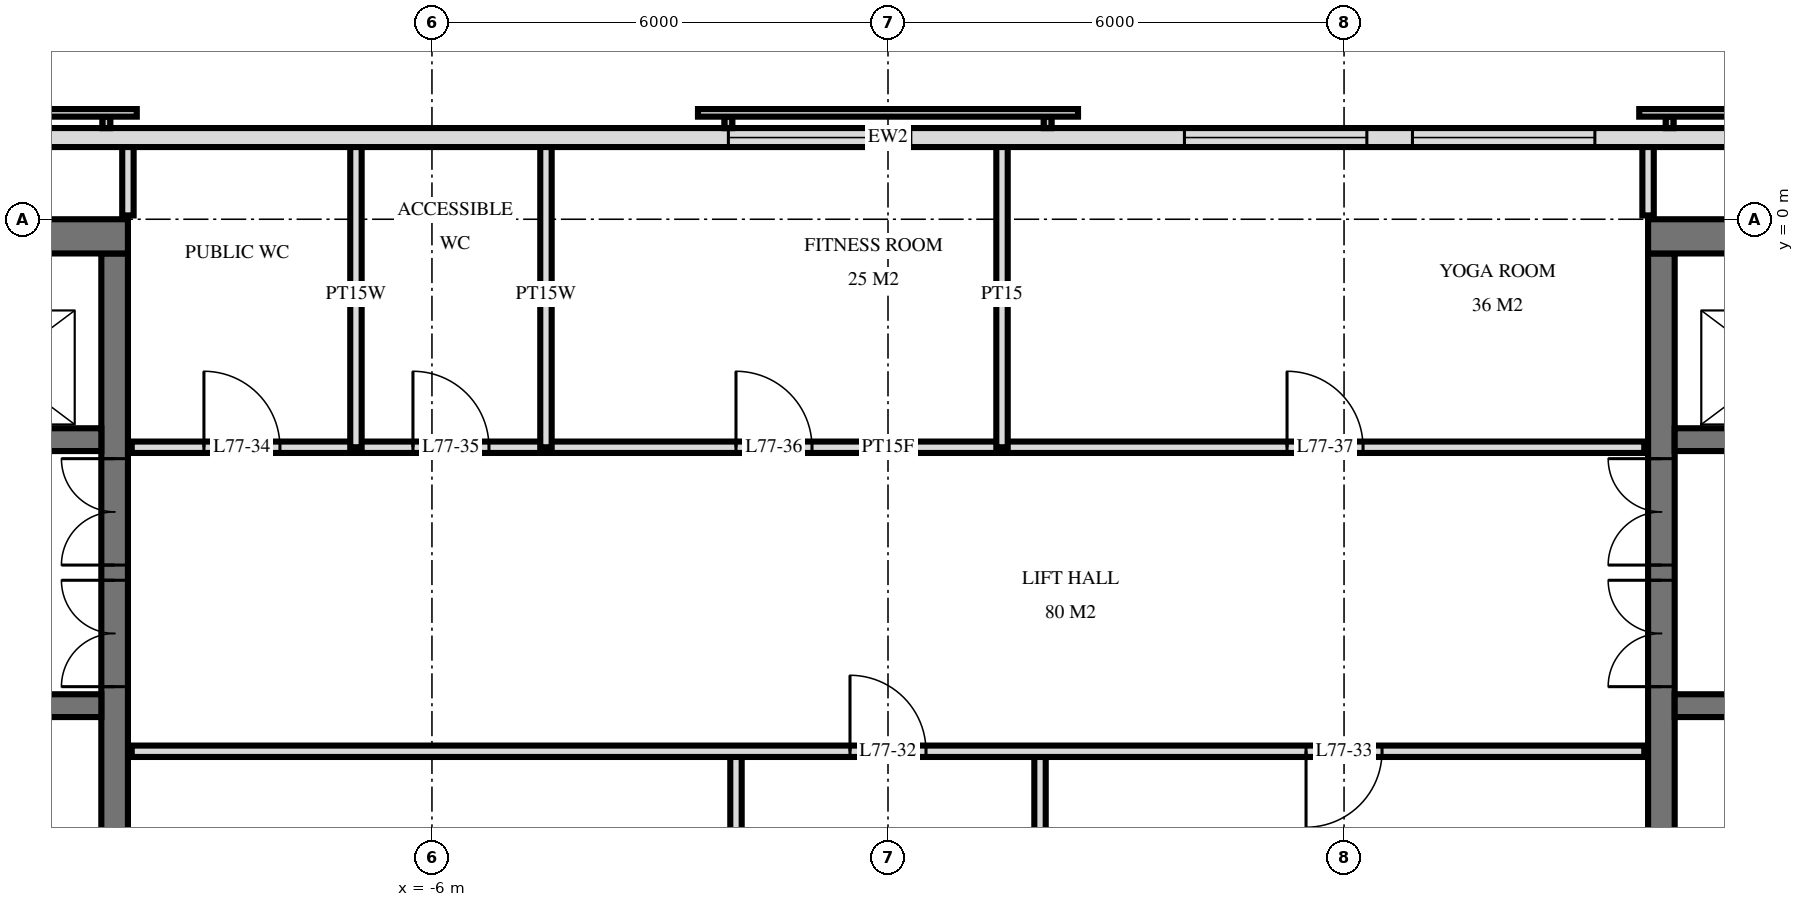
"""IFC4 building model, lengths in metres.
Left out: names, types, materials, properties, quantities, classifications, styles, units other than length and angle.
Written with IfcOpenShell. Run it as: python <this file> out.ifc"""

import sys

from ifc_helpers import new_model, si_unit, direction, frame, frame_2d, origin, place, context, subcontext, project, spatial, rectangle, extrude, element, fill, save


model = new_model("IFC4")
c1 = context("Model", 3, precision=1e-05, world=origin(), true_north=direction((0.0, 1.0)))
c2 = subcontext(c1, "Body", "Model", "MODEL_VIEW")
j1 = project(units=[si_unit("LENGTHUNIT", "METRE"), si_unit("PLANEANGLEUNIT", "RADIAN")], contexts=[c1])
p1 = place(None, origin())
s1 = spatial("IfcSite", under=j1, at=p1, CompositionType="ELEMENT")
p2 = place(p1, origin())
s2 = spatial("IfcBuilding", under=s1, at=p2, CompositionType="ELEMENT")
p3 = place(p2, frame((0.0, 0.0, 291.1)))
s3 = spatial("IfcBuildingStorey", under=s2, at=p3, CompositionType="ELEMENT", Elevation=291.1)
p4 = place(p3, frame((-19.5, -0.225, 0.0), z_axis=(0.0, 0.0, 1.0), x_axis=(1.0, 0.0, 0.0)))
e1 = element("IfcWall", 1, at=p4, inside=s3, PredefinedType="SHEAR", context=c2, shape_type="SweptSolid", body=[
    extrude(rectangle(XDim=9.5, YDim=0.45, at=frame_2d((4.75, 0.0))), origin(), (0.0, 0.0, 1.0), 3.5),
])
p5 = place(p3, frame((-10.175, -14.55, 0.0), z_axis=(0.0, 0.0, 1.0), x_axis=(0.0, 1.0, 0.0)))
e2 = element("IfcWall", 2, at=p5, inside=s3, PredefinedType="SHEAR", context=c2, shape_type="SweptSolid", body=[
    extrude(rectangle(XDim=14.1, YDim=0.35, at=frame_2d((7.05, 0.0))), origin(), (0.0, 0.0, 1.0), 3.5),
])
p6 = place(p5, frame((8.4, 0.0, 0.0)))
e3 = element("IfcOpeningElement", 3, at=p6, cuts=e2, PredefinedType="OPENING", context=c2, shape_type="SweptSolid", body=[
    extrude(rectangle(XDim=1.4, YDim=2.4, at=frame_2d((0.7, 1.2))), frame((0.0, 0.185, 0.0), z_axis=(0.0, -1.0, 0.0), x_axis=(1.0, 0.0, 0.0)), (0.0, 0.0, 1.0), 0.37),
])
p7 = place(p5, frame((10.0, 0.0, 0.0)))
e4 = element("IfcOpeningElement", 4, at=p7, cuts=e2, PredefinedType="OPENING", context=c2, shape_type="SweptSolid", body=[
    extrude(rectangle(XDim=1.4, YDim=2.4, at=frame_2d((0.7, 1.2))), frame((0.0, 0.185, 0.0), z_axis=(0.0, -1.0, 0.0), x_axis=(1.0, 0.0, 0.0)), (0.0, 0.0, 1.0), 0.37),
])
p8 = place(p5, frame((4.0, 0.0, 0.0)))
e5 = element("IfcOpeningElement", 5, at=p8, cuts=e2, PredefinedType="OPENING", context=c2, shape_type="SweptSolid", body=[
    extrude(rectangle(XDim=1.2, YDim=2.1, at=frame_2d((0.6, 1.05))), frame((0.0, 0.185, 0.0), z_axis=(0.0, -1.0, 0.0), x_axis=(1.0, 0.0, 0.0)), (0.0, 0.0, 1.0), 0.37),
])
p9 = place(p3, frame((-19.05, -2.9, 0.0), z_axis=(0.0, 0.0, 1.0), x_axis=(1.0, 0.0, 0.0)))
e6 = element("IfcWall", 6, at=p9, inside=s3, PredefinedType="SHEAR", context=c2, shape_type="SweptSolid", body=[
    extrude(rectangle(XDim=8.7, YDim=0.3, at=frame_2d((4.35, 0.0))), origin(), (0.0, 0.0, 1.0), 3.5),
])
p10 = place(p9, frame((6.8, 0.0, 0.0)))
e7 = element("IfcOpeningElement", 7, at=p10, cuts=e6, PredefinedType="OPENING", context=c2, shape_type="SweptSolid", body=[
    extrude(rectangle(XDim=1.1, YDim=2.1, at=frame_2d((0.55, 1.05))), frame((0.0, 0.16, 0.0), z_axis=(0.0, -1.0, 0.0), x_axis=(1.0, 0.0, 0.0)), (0.0, 0.0, 1.0), 0.32),
])
p11 = place(p9, frame((3.8, 0.0, 0.0)))
e8 = element("IfcOpeningElement", 8, at=p11, cuts=e6, PredefinedType="OPENING", context=c2, shape_type="SweptSolid", body=[
    extrude(rectangle(XDim=1.1, YDim=2.1, at=frame_2d((0.55, 1.05))), frame((0.0, 0.16, 0.0), z_axis=(0.0, -1.0, 0.0), x_axis=(1.0, 0.0, 0.0)), (0.0, 0.0, 1.0), 0.32),
])
p12 = place(p9, frame((1.613, 0.0, 0.0)))
e9 = element("IfcOpeningElement", 9, at=p12, cuts=e6, PredefinedType="OPENING", context=c2, shape_type="SweptSolid", body=[
    extrude(rectangle(XDim=0.9, YDim=2.1, at=frame_2d((0.45, 1.05))), frame((0.0, 0.16, 0.0), z_axis=(0.0, -1.0, 0.0), x_axis=(1.0, 0.0, 0.0)), (0.0, 0.0, 1.0), 0.32),
])
p13 = place(p9, frame((0.188, 0.0, 0.0)))
e10 = element("IfcOpeningElement", 10, at=p13, cuts=e6, PredefinedType="OPENING", context=c2, shape_type="SweptSolid", body=[
    extrude(rectangle(XDim=0.9, YDim=2.1, at=frame_2d((0.45, 1.05))), frame((0.0, 0.16, 0.0), z_axis=(0.0, -1.0, 0.0), x_axis=(1.0, 0.0, 0.0)), (0.0, 0.0, 1.0), 0.32),
])
p14 = place(p3, frame((-19.05, -6.4, 0.0), z_axis=(0.0, 0.0, 1.0), x_axis=(1.0, 0.0, 0.0)))
e11 = element("IfcWall", 11, at=p14, inside=s3, PredefinedType="SHEAR", context=c2, shape_type="SweptSolid", body=[
    extrude(rectangle(XDim=8.7, YDim=0.3, at=frame_2d((4.35, 0.0))), origin(), (0.0, 0.0, 1.0), 3.5),
])
p15 = place(p14, frame((0.8, 0.0, 0.0)))
e12 = element("IfcOpeningElement", 12, at=p15, cuts=e11, PredefinedType="OPENING", context=c2, shape_type="SweptSolid", body=[
    extrude(rectangle(XDim=1.1, YDim=2.1, at=frame_2d((0.55, 1.05))), frame((0.0, 0.16, 0.0), z_axis=(0.0, -1.0, 0.0), x_axis=(1.0, 0.0, 0.0)), (0.0, 0.0, 1.0), 0.32),
])
p16 = place(p3, frame((10.0, -0.225, 0.0), z_axis=(0.0, 0.0, 1.0), x_axis=(1.0, 0.0, 0.0)))
e13 = element("IfcWall", 13, at=p16, inside=s3, PredefinedType="SHEAR", context=c2, shape_type="SweptSolid", body=[
    extrude(rectangle(XDim=9.5, YDim=0.45, at=frame_2d((4.75, 0.0))), origin(), (0.0, 0.0, 1.0), 3.5),
])
p17 = place(p3, frame((10.175, -14.55, 0.0), z_axis=(0.0, 0.0, 1.0), x_axis=(0.0, 1.0, 0.0)))
e14 = element("IfcWall", 14, at=p17, inside=s3, PredefinedType="SHEAR", context=c2, shape_type="SweptSolid", body=[
    extrude(rectangle(XDim=14.1, YDim=0.35, at=frame_2d((7.05, 0.0))), origin(), (0.0, 0.0, 1.0), 3.5),
])
p18 = place(p17, frame((8.4, 0.0, 0.0)))
e15 = element("IfcOpeningElement", 15, at=p18, cuts=e14, PredefinedType="OPENING", context=c2, shape_type="SweptSolid", body=[
    extrude(rectangle(XDim=1.4, YDim=2.4, at=frame_2d((0.7, 1.2))), frame((0.0, 0.185, 0.0), z_axis=(0.0, -1.0, 0.0), x_axis=(1.0, 0.0, 0.0)), (0.0, 0.0, 1.0), 0.37),
])
p19 = place(p17, frame((10.0, 0.0, 0.0)))
e16 = element("IfcOpeningElement", 16, at=p19, cuts=e14, PredefinedType="OPENING", context=c2, shape_type="SweptSolid", body=[
    extrude(rectangle(XDim=1.4, YDim=2.4, at=frame_2d((0.7, 1.2))), frame((0.0, 0.185, 0.0), z_axis=(0.0, -1.0, 0.0), x_axis=(1.0, 0.0, 0.0)), (0.0, 0.0, 1.0), 0.37),
])
p20 = place(p17, frame((4.0, 0.0, 0.0)))
e17 = element("IfcOpeningElement", 17, at=p20, cuts=e14, PredefinedType="OPENING", context=c2, shape_type="SweptSolid", body=[
    extrude(rectangle(XDim=1.2, YDim=2.1, at=frame_2d((0.6, 1.05))), frame((0.0, 0.185, 0.0), z_axis=(0.0, -1.0, 0.0), x_axis=(1.0, 0.0, 0.0)), (0.0, 0.0, 1.0), 0.37),
])
p21 = place(p3, frame((10.35, -2.9, 0.0), z_axis=(0.0, 0.0, 1.0), x_axis=(1.0, 0.0, 0.0)))
e18 = element("IfcWall", 18, at=p21, inside=s3, PredefinedType="SHEAR", context=c2, shape_type="SweptSolid", body=[
    extrude(rectangle(XDim=8.7, YDim=0.3, at=frame_2d((4.35, 0.0))), origin(), (0.0, 0.0, 1.0), 3.5),
])
p22 = place(p21, frame((0.8, 0.0, 0.0)))
e19 = element("IfcOpeningElement", 19, at=p22, cuts=e18, PredefinedType="OPENING", context=c2, shape_type="SweptSolid", body=[
    extrude(rectangle(XDim=1.1, YDim=2.1, at=frame_2d((0.55, 1.05))), frame((0.0, 0.16, 0.0), z_axis=(0.0, -1.0, 0.0), x_axis=(1.0, 0.0, 0.0)), (0.0, 0.0, 1.0), 0.32),
])
p23 = place(p21, frame((3.8, 0.0, 0.0)))
e20 = element("IfcOpeningElement", 20, at=p23, cuts=e18, PredefinedType="OPENING", context=c2, shape_type="SweptSolid", body=[
    extrude(rectangle(XDim=1.1, YDim=2.1, at=frame_2d((0.55, 1.05))), frame((0.0, 0.16, 0.0), z_axis=(0.0, -1.0, 0.0), x_axis=(1.0, 0.0, 0.0)), (0.0, 0.0, 1.0), 0.32),
])
p24 = place(p21, frame((6.188, 0.0, 0.0)))
e21 = element("IfcOpeningElement", 21, at=p24, cuts=e18, PredefinedType="OPENING", context=c2, shape_type="SweptSolid", body=[
    extrude(rectangle(XDim=0.9, YDim=2.1, at=frame_2d((0.45, 1.05))), frame((0.0, 0.16, 0.0), z_axis=(0.0, -1.0, 0.0), x_axis=(1.0, 0.0, 0.0)), (0.0, 0.0, 1.0), 0.32),
])
p25 = place(p21, frame((7.613, 0.0, 0.0)))
e22 = element("IfcOpeningElement", 22, at=p25, cuts=e18, PredefinedType="OPENING", context=c2, shape_type="SweptSolid", body=[
    extrude(rectangle(XDim=0.9, YDim=2.1, at=frame_2d((0.45, 1.05))), frame((0.0, 0.16, 0.0), z_axis=(0.0, -1.0, 0.0), x_axis=(1.0, 0.0, 0.0)), (0.0, 0.0, 1.0), 0.32),
])
p26 = place(p3, frame((10.35, -6.4, 0.0), z_axis=(0.0, 0.0, 1.0), x_axis=(1.0, 0.0, 0.0)))
e23 = element("IfcWall", 23, at=p26, inside=s3, PredefinedType="SHEAR", context=c2, shape_type="SweptSolid", body=[
    extrude(rectangle(XDim=8.7, YDim=0.3, at=frame_2d((4.35, 0.0))), origin(), (0.0, 0.0, 1.0), 3.5),
])
p27 = place(p26, frame((6.8, 0.0, 0.0)))
e24 = element("IfcOpeningElement", 24, at=p27, cuts=e23, PredefinedType="OPENING", context=c2, shape_type="SweptSolid", body=[
    extrude(rectangle(XDim=1.1, YDim=2.1, at=frame_2d((0.55, 1.05))), frame((0.0, 0.16, 0.0), z_axis=(0.0, -1.0, 0.0), x_axis=(1.0, 0.0, 0.0)), (0.0, 0.0, 1.0), 0.32),
])
p28 = place(p3, frame((18.575, 1.075, 0.0), z_axis=(0.0, 0.0, 1.0), x_axis=(-1.0, 0.0, 0.0)))
e25 = element("IfcWall", 25, at=p28, inside=s3, PredefinedType="SOLIDWALL", context=c2, shape_type="SweptSolid", body=[
    extrude(rectangle(XDim=37.151, YDim=0.25, at=frame_2d((18.575, 0.0))), origin(), (0.0, 0.0, 1.0), 3.22),
])
p29 = place(p28, frame((9.275, 0.0, 0.9)))
e26 = element("IfcOpeningElement", 26, at=p29, cuts=e25, PredefinedType="OPENING", context=c2, shape_type="SweptSolid", body=[
    extrude(rectangle(XDim=2.4, YDim=1.5, at=frame_2d((1.2, 0.75))), frame((0.0, 0.135, 0.0), z_axis=(0.0, -1.0, 0.0), x_axis=(1.0, 0.0, 0.0)), (0.0, 0.0, 1.0), 0.27),
])
p30 = place(p28, frame((12.275, 0.0, 0.9)))
e27 = element("IfcOpeningElement", 27, at=p30, cuts=e25, PredefinedType="OPENING", context=c2, shape_type="SweptSolid", body=[
    extrude(rectangle(XDim=2.4, YDim=1.5, at=frame_2d((1.2, 0.75))), frame((0.0, 0.135, 0.0), z_axis=(0.0, -1.0, 0.0), x_axis=(1.0, 0.0, 0.0)), (0.0, 0.0, 1.0), 0.27),
])
p31 = place(p28, frame((18.275, 0.0, 0.9)))
e28 = element("IfcOpeningElement", 28, at=p31, cuts=e25, PredefinedType="OPENING", context=c2, shape_type="SweptSolid", body=[
    extrude(rectangle(XDim=2.4, YDim=1.5, at=frame_2d((1.2, 0.75))), frame((0.0, 0.135, 0.0), z_axis=(0.0, -1.0, 0.0), x_axis=(1.0, 0.0, 0.0)), (0.0, 0.0, 1.0), 0.27),
])
p32 = place(p3, frame((10.0, 0.05, 0.0), z_axis=(0.0, 0.0, 1.0), x_axis=(0.0, 1.0, 0.0)))
e29 = element("IfcWall", 29, at=p32, inside=s3, PredefinedType="PARTITIONING", context=c2, shape_type="SweptSolid", body=[
    extrude(rectangle(XDim=0.97, YDim=0.15, at=frame_2d((0.485, 0.0))), origin(), (0.0, 0.0, 1.0), 3.22),
])
p33 = place(p3, frame((2.0, -11.0, 0.0), z_axis=(0.0, 0.0, 1.0), x_axis=(0.0, 1.0, 0.0)))
e30 = element("IfcWall", 30, at=p33, inside=s3, PredefinedType="PARTITIONING", context=c2, shape_type="SweptSolid", body=[
    extrude(rectangle(XDim=4.0, YDim=0.15, at=frame_2d((2.0, 0.0))), origin(), (0.0, 0.0, 1.0), 3.22),
])
p34 = place(p3, frame((1.5, -3.0, 0.0), z_axis=(0.0, 0.0, 1.0), x_axis=(0.0, 1.0, 0.0)))
e31 = element("IfcWall", 31, at=p34, inside=s3, PredefinedType="PARTITIONING", context=c2, shape_type="SweptSolid", body=[
    extrude(rectangle(XDim=4.02, YDim=0.15, at=frame_2d((2.01, 0.0))), origin(), (0.0, 0.0, 1.0), 3.22),
])
p35 = place(p3, frame((-2.0, -11.0, 0.0), z_axis=(0.0, 0.0, 1.0), x_axis=(0.0, 1.0, 0.0)))
e32 = element("IfcWall", 32, at=p35, inside=s3, PredefinedType="PARTITIONING", context=c2, shape_type="SweptSolid", body=[
    extrude(rectangle(XDim=4.0, YDim=0.15, at=frame_2d((2.0, 0.0))), origin(), (0.0, 0.0, 1.0), 3.22),
])
for number, where, z_axis, x_axis in (
    (33, (-4.5, -3.0, 0.0), (0.0, 0.0, 1.0), (0.0, 1.0, 0.0)),
    (34, (-7.0, -3.0, 0.0), (0.0, 0.0, 1.0), (0.0, 1.0, 0.0)),
):
    element("IfcWall", number, at=place(p3, frame(where, z_axis=z_axis, x_axis=x_axis)), inside=s3, PredefinedType="PLUMBINGWALL", context=c2, shape_type="SweptSolid", body=[
        extrude(rectangle(XDim=4.02, YDim=0.15, at=frame_2d((2.01, 0.0))), origin(), (0.0, 0.0, 1.0), 3.22),
    ])
p36 = place(p3, frame((-10.0, 0.05, 0.0), z_axis=(0.0, 0.0, 1.0), x_axis=(0.0, 1.0, 0.0)))
e35 = element("IfcWall", 35, at=p36, inside=s3, PredefinedType="PLUMBINGWALL", context=c2, shape_type="SweptSolid", body=[
    extrude(rectangle(XDim=0.97, YDim=0.15, at=frame_2d((0.485, 0.0))), origin(), (0.0, 0.0, 1.0), 3.22),
])
p37 = place(p3, frame((-9.95, -7.0, 0.0), z_axis=(0.0, 0.0, 1.0), x_axis=(1.0, 0.0, 0.0)))
e36 = element("IfcWall", 36, at=p37, inside=s3, PredefinedType="PARTITIONING", context=c2, shape_type="SweptSolid", body=[
    extrude(rectangle(XDim=19.9, YDim=0.15, at=frame_2d((9.95, 0.0))), origin(), (0.0, 0.0, 1.0), 3.22),
])
p38 = place(p37, frame((9.45, 0.0, 0.0)))
e37 = element("IfcOpeningElement", 37, at=p38, cuts=e36, PredefinedType="OPENING", context=c2, shape_type="SweptSolid", body=[
    extrude(rectangle(XDim=1.0, YDim=2.1, at=frame_2d((0.5, 1.05))), frame((0.0, 0.085, 0.0), z_axis=(0.0, -1.0, 0.0), x_axis=(1.0, 0.0, 0.0)), (0.0, 0.0, 1.0), 0.17),
])
p39 = place(p37, frame((15.45, 0.0, 0.0)))
e38 = element("IfcOpeningElement", 38, at=p39, cuts=e36, PredefinedType="OPENING", context=c2, shape_type="SweptSolid", body=[
    extrude(rectangle(XDim=1.0, YDim=2.1, at=frame_2d((0.5, 1.05))), frame((0.0, 0.085, 0.0), z_axis=(0.0, -1.0, 0.0), x_axis=(1.0, 0.0, 0.0)), (0.0, 0.0, 1.0), 0.17),
])
p40 = place(p3, frame((-9.95, -3.0, 0.0), z_axis=(0.0, 0.0, 1.0), x_axis=(1.0, 0.0, 0.0)))
e39 = element("IfcWall", 39, at=p40, inside=s3, PredefinedType="PARTITIONING", context=c2, shape_type="SweptSolid", body=[
    extrude(rectangle(XDim=19.9, YDim=0.15, at=frame_2d((9.95, 0.0))), origin(), (0.0, 0.0, 1.0), 3.22),
])
p41 = place(p40, frame((0.95, 0.0, 0.0)))
e40 = element("IfcOpeningElement", 40, at=p41, cuts=e39, PredefinedType="OPENING", context=c2, shape_type="SweptSolid", body=[
    extrude(rectangle(XDim=1.0, YDim=2.1, at=frame_2d((0.5, 1.05))), frame((0.0, 0.085, 0.0), z_axis=(0.0, -1.0, 0.0), x_axis=(1.0, 0.0, 0.0)), (0.0, 0.0, 1.0), 0.17),
])
p42 = place(p40, frame((3.7, 0.0, 0.0)))
e41 = element("IfcOpeningElement", 41, at=p42, cuts=e39, PredefinedType="OPENING", context=c2, shape_type="SweptSolid", body=[
    extrude(rectangle(XDim=1.0, YDim=2.1, at=frame_2d((0.5, 1.05))), frame((0.0, 0.085, 0.0), z_axis=(0.0, -1.0, 0.0), x_axis=(1.0, 0.0, 0.0)), (0.0, 0.0, 1.0), 0.17),
])
p43 = place(p40, frame((7.95, 0.0, 0.0)))
e42 = element("IfcOpeningElement", 42, at=p43, cuts=e39, PredefinedType="OPENING", context=c2, shape_type="SweptSolid", body=[
    extrude(rectangle(XDim=1.0, YDim=2.1, at=frame_2d((0.5, 1.05))), frame((0.0, 0.085, 0.0), z_axis=(0.0, -1.0, 0.0), x_axis=(1.0, 0.0, 0.0)), (0.0, 0.0, 1.0), 0.17),
])
p44 = place(p40, frame((15.2, 0.0, 0.0)))
e43 = element("IfcOpeningElement", 43, at=p44, cuts=e39, PredefinedType="OPENING", context=c2, shape_type="SweptSolid", body=[
    extrude(rectangle(XDim=1.0, YDim=2.1, at=frame_2d((0.5, 1.05))), frame((0.0, 0.085, 0.0), z_axis=(0.0, -1.0, 0.0), x_axis=(1.0, 0.0, 0.0)), (0.0, 0.0, 1.0), 0.17),
])
p45 = place(p29, origin())
e44 = element("IfcWindow", 44, at=p45, inside=s3, PartitioningType="SINGLE_PANEL", PredefinedType="WINDOW", context=c2, shape_type="SweptSolid", body=[
    extrude(rectangle(XDim=2.4, YDim=1.5, at=frame_2d((1.2, 0.75))), frame((0.0, 0.03, 0.0), z_axis=(0.0, -1.0, 0.0), x_axis=(1.0, 0.0, 0.0)), (0.0, 0.0, 1.0), 0.06),
])
fill(e26, e44)
p46 = place(p30, origin())
e45 = element("IfcWindow", 45, at=p46, inside=s3, PartitioningType="SINGLE_PANEL", PredefinedType="WINDOW", context=c2, shape_type="SweptSolid", body=[
    extrude(rectangle(XDim=2.4, YDim=1.5, at=frame_2d((1.2, 0.75))), frame((0.0, 0.03, 0.0), z_axis=(0.0, -1.0, 0.0), x_axis=(1.0, 0.0, 0.0)), (0.0, 0.0, 1.0), 0.06),
])
fill(e27, e45)
p47 = place(p31, origin())
e46 = element("IfcWindow", 46, at=p47, inside=s3, PartitioningType="SINGLE_PANEL", PredefinedType="WINDOW", context=c2, shape_type="SweptSolid", body=[
    extrude(rectangle(XDim=2.4, YDim=1.5, at=frame_2d((1.2, 0.75))), frame((0.0, 0.03, 0.0), z_axis=(0.0, -1.0, 0.0), x_axis=(1.0, 0.0, 0.0)), (0.0, 0.0, 1.0), 0.06),
])
fill(e28, e46)
p48 = place(p6, origin())
e47 = element("IfcDoor", 47, at=p48, inside=s3, OperationType="DOUBLE_DOOR_SINGLE_SWING", PredefinedType="DOOR", context=c2, shape_type="SweptSolid", body=[
    extrude(rectangle(XDim=1.4, YDim=2.4, at=frame_2d((0.7, 1.2))), frame((0.0, 0.025, 0.0), z_axis=(0.0, -1.0, 0.0), x_axis=(1.0, 0.0, 0.0)), (0.0, 0.0, 1.0), 0.05),
])
fill(e3, e47)
p49 = place(p7, origin())
e48 = element("IfcDoor", 48, at=p49, inside=s3, OperationType="DOUBLE_DOOR_SINGLE_SWING", PredefinedType="DOOR", context=c2, shape_type="SweptSolid", body=[
    extrude(rectangle(XDim=1.4, YDim=2.4, at=frame_2d((0.7, 1.2))), frame((0.0, 0.025, 0.0), z_axis=(0.0, -1.0, 0.0), x_axis=(1.0, 0.0, 0.0)), (0.0, 0.0, 1.0), 0.05),
])
fill(e4, e48)
p50 = place(p18, origin())
e49 = element("IfcDoor", 49, at=p50, inside=s3, OperationType="DOUBLE_DOOR_SINGLE_SWING", PredefinedType="DOOR", context=c2, shape_type="SweptSolid", body=[
    extrude(rectangle(XDim=1.4, YDim=2.4, at=frame_2d((0.7, 1.2))), frame((0.0, 0.025, 0.0), z_axis=(0.0, -1.0, 0.0), x_axis=(1.0, 0.0, 0.0)), (0.0, 0.0, 1.0), 0.05),
])
fill(e15, e49)
p51 = place(p19, origin())
e50 = element("IfcDoor", 50, at=p51, inside=s3, OperationType="DOUBLE_DOOR_SINGLE_SWING", PredefinedType="DOOR", context=c2, shape_type="SweptSolid", body=[
    extrude(rectangle(XDim=1.4, YDim=2.4, at=frame_2d((0.7, 1.2))), frame((0.0, 0.025, 0.0), z_axis=(0.0, -1.0, 0.0), x_axis=(1.0, 0.0, 0.0)), (0.0, 0.0, 1.0), 0.05),
])
fill(e16, e50)
p52 = place(p38, origin())
e51 = element("IfcDoor", 51, at=p52, inside=s3, OperationType="SINGLE_SWING_RIGHT", PredefinedType="DOOR", context=c2, shape_type="SweptSolid", body=[
    extrude(rectangle(XDim=1.0, YDim=2.1, at=frame_2d((0.5, 1.05))), frame((0.0, 0.025, 0.0), z_axis=(0.0, -1.0, 0.0), x_axis=(1.0, 0.0, 0.0)), (0.0, 0.0, 1.0), 0.05),
])
fill(e37, e51)
p53 = place(p39, frame((0.5, 0.0, 0.0), z_axis=(0.0, 0.0, 1.0), x_axis=(-1.0, 0.0, 0.0)))
e52 = element("IfcDoor", 52, at=p53, inside=s3, OperationType="SINGLE_SWING_LEFT", PredefinedType="DOOR", context=c2, shape_type="SweptSolid", body=[
    extrude(rectangle(XDim=1.0, YDim=2.1, at=frame_2d((0.0, 1.05))), frame((0.0, -0.025, 0.0), z_axis=(0.0, 1.0, 0.0), x_axis=(-1.0, 0.0, 0.0)), (0.0, 0.0, 1.0), 0.05),
])
fill(e38, e52)
p54 = place(p41, origin())
e53 = element("IfcDoor", 53, at=p54, inside=s3, OperationType="SINGLE_SWING_RIGHT", PredefinedType="DOOR", context=c2, shape_type="SweptSolid", body=[
    extrude(rectangle(XDim=1.0, YDim=2.1, at=frame_2d((0.5, 1.05))), frame((0.0, 0.025, 0.0), z_axis=(0.0, -1.0, 0.0), x_axis=(1.0, 0.0, 0.0)), (0.0, 0.0, 1.0), 0.05),
])
fill(e40, e53)
p55 = place(p42, origin())
e54 = element("IfcDoor", 54, at=p55, inside=s3, OperationType="SINGLE_SWING_RIGHT", PredefinedType="DOOR", context=c2, shape_type="SweptSolid", body=[
    extrude(rectangle(XDim=1.0, YDim=2.1, at=frame_2d((0.5, 1.05))), frame((0.0, 0.025, 0.0), z_axis=(0.0, -1.0, 0.0), x_axis=(1.0, 0.0, 0.0)), (0.0, 0.0, 1.0), 0.05),
])
fill(e41, e54)
p56 = place(p43, origin())
e55 = element("IfcDoor", 55, at=p56, inside=s3, OperationType="SINGLE_SWING_RIGHT", PredefinedType="DOOR", context=c2, shape_type="SweptSolid", body=[
    extrude(rectangle(XDim=1.0, YDim=2.1, at=frame_2d((0.5, 1.05))), frame((0.0, 0.025, 0.0), z_axis=(0.0, -1.0, 0.0), x_axis=(1.0, 0.0, 0.0)), (0.0, 0.0, 1.0), 0.05),
])
fill(e42, e55)
p57 = place(p44, origin())
e56 = element("IfcDoor", 56, at=p57, inside=s3, OperationType="SINGLE_SWING_RIGHT", PredefinedType="DOOR", context=c2, shape_type="SweptSolid", body=[
    extrude(rectangle(XDim=1.0, YDim=2.1, at=frame_2d((0.5, 1.05))), frame((0.0, 0.025, 0.0), z_axis=(0.0, -1.0, 0.0), x_axis=(1.0, 0.0, 0.0)), (0.0, 0.0, 1.0), 0.05),
])
fill(e43, e56)
save(model, sys.argv[1])
